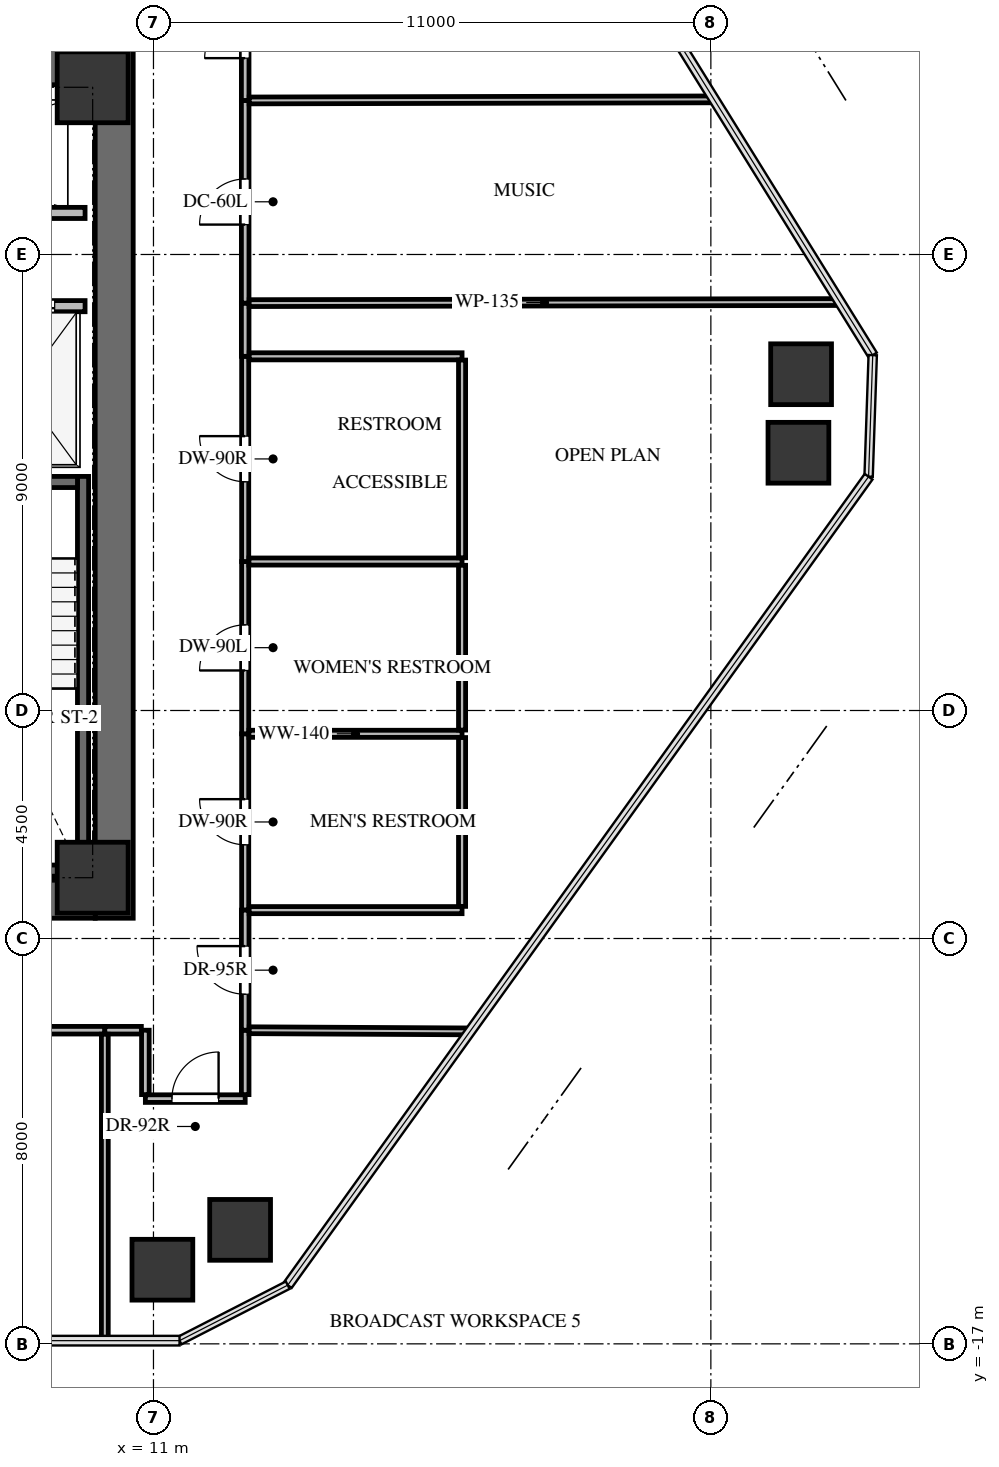
"""IFC4 building model, lengths in metres.
Left out: names, types, materials, properties, quantities, classifications, styles, units other than length and angle.
Written with IfcOpenShell. Run it as: python <this file> out.ifc"""

import sys

from ifc_helpers import new_model, si_unit, direction, frame, frame_2d, origin, origin_2d, place, context, subcontext, project, spatial, rectangle, extrude, source, transform, mapped, element, fill, save


model = new_model("IFC4")
c1 = context("Model", 3, precision=1e-05, world=origin(), true_north=direction((0.0, 1.0)))
c2 = subcontext(c1, "Body", "Model", "MODEL_VIEW")
j1 = project(units=[si_unit("LENGTHUNIT", "METRE"), si_unit("PLANEANGLEUNIT", "RADIAN")], contexts=[c1])
p1 = place(None, origin())
s1 = spatial("IfcSite", under=j1, at=p1, CompositionType="ELEMENT")
p2 = place(p1, origin())
s2 = spatial("IfcBuilding", under=s1, at=p2, CompositionType="ELEMENT")
p3 = place(p2, frame((0.0, 0.0, 130.5)))
s3 = spatial("IfcBuildingStorey", under=s2, at=p3, CompositionType="ELEMENT", Elevation=130.5)
p4 = place(p3, frame((10.225, -8.6, 0.0), z_axis=(0.0, 0.0, 1.0), x_axis=(0.0, 1.0, 0.0)))
e1 = element("IfcWall", 1, at=p4, inside=s3, PredefinedType="SHEAR", context=c2, shape_type="SweptSolid", body=[
    extrude(rectangle(XDim=17.2, YDim=0.75, at=frame_2d((8.6, 0.0))), origin(), (0.0, 0.0, 1.0), 3.3),
])
p5 = place(p3, frame((2.1, -8.225, 0.0), z_axis=(0.0, 0.0, 1.0), x_axis=(1.0, 0.0, 0.0)))
e2 = element("IfcWall", 2, at=p5, inside=s3, PredefinedType="SHEAR", context=c2, shape_type="SweptSolid", body=[
    extrude(rectangle(XDim=7.75, YDim=0.75, at=frame_2d((3.875, 0.0))), origin(), (0.0, 0.0, 1.0), 3.3),
])
p6 = place(p3, frame((-9.85, 8.225, 0.0), z_axis=(0.0, 0.0, 1.0), x_axis=(1.0, 0.0, 0.0)))
e3 = element("IfcWall", 3, at=p6, inside=s3, PredefinedType="SHEAR", context=c2, shape_type="SweptSolid", body=[
    extrude(rectangle(XDim=19.7, YDim=0.75, at=frame_2d((9.85, 0.0))), origin(), (0.0, 0.0, 1.0), 3.3),
])
p7 = place(p3, frame((9.61, -7.77, -0.24), z_axis=(0.0, 0.0, 1.0), x_axis=(0.0, 1.0, 0.0)))
e4 = element("IfcWall", 4, at=p7, inside=s3, PredefinedType="SHEAR", context=c2, shape_type="SweptSolid", body=[
    extrude(rectangle(XDim=7.89, YDim=0.22, at=frame_2d((3.945, 0.0))), origin(), (0.0, 0.0, 1.0), 3.3),
])
for number, where, z_axis, x_axis in (
    (5, (6.54, -7.66, -0.24), (0.0, 0.0, 1.0), (1.0, 0.0, 0.0)),
    (6, (9.5, 0.01, -0.24), (0.0, 0.0, 1.0), (-1.0, 0.0, 0.0)),
):
    element("IfcWall", number, at=place(p3, frame(where, z_axis=z_axis, x_axis=x_axis)), inside=s3, PredefinedType="SHEAR", context=c2, shape_type="SweptSolid", body=[
        extrude(rectangle(XDim=2.96, YDim=0.22, at=frame_2d((1.48, 0.0))), origin(), (0.0, 0.0, 1.0), 3.3),
    ])
m1 = source(origin(), c2, "Body", "SweptSolid", [
    extrude(rectangle(XDim=1.4, YDim=1.4, at=origin_2d()), origin(), (0.0, 0.0, 1.0), 3.3),
])
for number, where, z_axis, x_axis in (
    (7, (9.8, -7.8, -0.24), (0.0, 0.0, 1.0), (1.0, 0.0, 0.0)),
    (8, (9.8, 7.8, -0.24), (0.0, 0.0, 1.0), (1.0, 0.0, 0.0)),
):
    element("IfcColumn", number, at=place(p3, frame(where, z_axis=z_axis, x_axis=x_axis)), inside=s3, PredefinedType="COLUMN", context=c2, shape_type="MappedRepresentation", body=[
        mapped(m1, transform((0.0, 0.0, 0.0), x_axis=(1.0, 0.0, 0.0), y_axis=(0.0, 1.0, 0.0), z_axis=(0.0, 0.0, 1.0), scale=1.0)),
    ])
m2 = source(origin(), c2, "Body", "SweptSolid", [
    extrude(rectangle(XDim=1.2, YDim=1.2, at=origin_2d()), origin(), (0.0, 0.0, 1.0), 3.3),
])
for number, where, z_axis, x_axis in (
    (9, (23.781, 2.137, -0.24), (0.0, 0.0, 1.0), (1.0, 0.0, 0.0)),
    (10, (23.728, 0.587, -0.24), (0.0, 0.0, 1.0), (1.0, 0.0, 0.0)),
    (11, (12.71, -14.75, -0.24), (0.0, 0.0, 1.0), (1.0, 0.0, 0.0)),
    (12, (11.176, -15.537, -0.24), (0.0, 0.0, 1.0), (1.0, 0.0, 0.0)),
):
    element("IfcColumn", number, at=place(p3, frame(where, z_axis=z_axis, x_axis=x_axis)), inside=s3, PredefinedType="COLUMN", context=c2, shape_type="MappedRepresentation", body=[
        mapped(m2, transform((0.0, 0.0, 0.0), x_axis=(1.0, 0.0, 0.0), y_axis=(0.0, 1.0, 0.0), z_axis=(0.0, 0.0, 1.0), scale=1.0)),
    ])
p8 = place(p3, frame((4.6, 3.48, 0.0), z_axis=(0.0, 0.0, 1.0), x_axis=(1.0, 0.0, 0.0)))
e13 = element("IfcWall", 13, at=p8, inside=s3, PredefinedType="SOLIDWALL", context=c2, shape_type="SweptSolid", body=[
    extrude(rectangle(XDim=5.05, YDim=0.22, at=frame_2d((2.525, 0.0))), origin(), (0.0, 0.0, 1.0), 3.045),
])
p9 = place(p8, frame((0.55, 0.0, 0.0)))
e14 = element("IfcOpeningElement", 14, at=p9, cuts=e13, PredefinedType="OPENING", context=c2, shape_type="SweptSolid", body=[
    extrude(rectangle(XDim=1.4, YDim=2.15, at=frame_2d((0.7, 1.075))), frame((0.0, 0.12, 0.0), z_axis=(0.0, -1.0, 0.0), x_axis=(1.0, 0.0, 0.0)), (0.0, 0.0, 1.0), 0.24),
])
p10 = place(p8, frame((3.05, 0.0, 0.0)))
e15 = element("IfcOpeningElement", 15, at=p10, cuts=e13, PredefinedType="OPENING", context=c2, shape_type="SweptSolid", body=[
    extrude(rectangle(XDim=1.4, YDim=2.15, at=frame_2d((0.7, 1.075))), frame((0.0, 0.12, 0.0), z_axis=(0.0, -1.0, 0.0), x_axis=(1.0, 0.0, 0.0)), (0.0, 0.0, 1.0), 0.24),
])
p11 = place(p3, frame((2.325, 5.32, 0.0), z_axis=(0.0, 0.0, 1.0), x_axis=(1.0, 0.0, 0.0)))
e16 = element("IfcWall", 16, at=p11, inside=s3, PredefinedType="SOLIDWALL", context=c2, shape_type="SweptSolid", body=[
    extrude(rectangle(XDim=7.325, YDim=0.22, at=frame_2d((3.663, 0.0))), origin(), (0.0, 0.0, 1.0), 3.045),
])
p12 = place(p3, frame((12.81, -8.44, 0.0), z_axis=(0.0, 0.0, 1.0), x_axis=(0.0, 1.0, 0.0)))
e17 = element("IfcWall", 17, at=p12, inside=s3, PredefinedType="PARTITIONING", context=c2, shape_type="SweptSolid", body=[
    extrude(rectangle(XDim=3.48, YDim=0.14, at=frame_2d((1.74, 0.0))), origin(), (0.0, 0.0, 1.0), 3.045),
])
p13 = place(p12, frame((1.29, 0.0, 0.0)))
e18 = element("IfcOpeningElement", 18, at=p13, cuts=e17, PredefinedType="OPENING", context=c2, shape_type="SweptSolid", body=[
    extrude(rectangle(XDim=0.9, YDim=2.05, at=frame_2d((0.45, 1.025))), frame((0.0, 0.08, 0.0), z_axis=(0.0, -1.0, 0.0), x_axis=(1.0, 0.0, 0.0)), (0.0, 0.0, 1.0), 0.16),
])
p14 = place(p3, frame((12.81, -4.96, 0.0), z_axis=(0.0, 0.0, 1.0), x_axis=(0.0, 1.0, 0.0)))
e19 = element("IfcWall", 19, at=p14, inside=s3, PredefinedType="PARTITIONING", context=c2, shape_type="SweptSolid", body=[
    extrude(rectangle(XDim=3.4, YDim=0.14, at=frame_2d((1.7, 0.0))), origin(), (0.0, 0.0, 1.0), 3.045),
])
p15 = place(p14, frame((1.25, 0.0, 0.0)))
e20 = element("IfcOpeningElement", 20, at=p15, cuts=e19, PredefinedType="OPENING", context=c2, shape_type="SweptSolid", body=[
    extrude(rectangle(XDim=0.9, YDim=2.05, at=frame_2d((0.45, 1.025))), frame((0.0, 0.08, 0.0), z_axis=(0.0, -1.0, 0.0), x_axis=(1.0, 0.0, 0.0)), (0.0, 0.0, 1.0), 0.16),
])
p16 = place(p3, frame((12.81, -1.56, 0.0), z_axis=(0.0, 0.0, 1.0), x_axis=(0.0, 1.0, 0.0)))
e21 = element("IfcWall", 21, at=p16, inside=s3, PredefinedType="PARTITIONING", context=c2, shape_type="SweptSolid", body=[
    extrude(rectangle(XDim=4.05, YDim=0.14, at=frame_2d((2.025, 0.0))), origin(), (0.0, 0.0, 1.0), 2.212),
])
p17 = place(p16, frame((1.575, 0.0, 0.0)))
e22 = element("IfcOpeningElement", 22, at=p17, cuts=e21, PredefinedType="OPENING", context=c2, shape_type="SweptSolid", body=[
    extrude(rectangle(XDim=0.9, YDim=2.05, at=frame_2d((0.45, 1.025))), frame((0.0, 0.08, 0.0), z_axis=(0.0, -1.0, 0.0), x_axis=(1.0, 0.0, 0.0)), (0.0, 0.0, 1.0), 0.16),
])
p18 = place(p3, frame((2.54, -10.81, 0.0), z_axis=(0.0, 0.0, 1.0), x_axis=(1.0, 0.0, 0.0)))
e23 = element("IfcWall", 23, at=p18, inside=s3, PredefinedType="PARTITIONING", context=c2, shape_type="SweptSolid", body=[
    extrude(rectangle(XDim=7.5, YDim=0.15, at=frame_2d((3.75, 0.0))), origin(), (0.0, 0.0, 1.0), 2.212),
])
p19 = place(p18, frame((3.3, 0.0, 0.0)))
e24 = element("IfcOpeningElement", 24, at=p19, cuts=e23, PredefinedType="OPENING", context=c2, shape_type="SweptSolid", body=[
    extrude(rectangle(XDim=0.9, YDim=2.05, at=frame_2d((0.45, 1.025))), frame((0.0, 0.085, 0.0), z_axis=(0.0, -1.0, 0.0), x_axis=(1.0, 0.0, 0.0)), (0.0, 0.0, 1.0), 0.17),
])
p20 = place(p3, frame((10.84, -12.16, 0.0), z_axis=(0.0, 0.0, 1.0), x_axis=(1.0, 0.0, 0.0)))
e25 = element("IfcWall", 25, at=p20, inside=s3, PredefinedType="PARTITIONING", context=c2, shape_type="SweptSolid", body=[
    extrude(rectangle(XDim=1.97, YDim=0.15, at=frame_2d((0.985, 0.0))), origin(), (0.0, 0.0, 1.0), 3.045),
])
p21 = place(p20, frame((0.525, 0.0, 0.0)))
e26 = element("IfcOpeningElement", 26, at=p21, cuts=e25, PredefinedType="OPENING", context=c2, shape_type="SweptSolid", body=[
    extrude(rectangle(XDim=0.92, YDim=2.1, at=frame_2d((0.46, 1.05))), frame((0.0, 0.085, 0.0), z_axis=(0.0, -1.0, 0.0), x_axis=(1.0, 0.0, 0.0)), (0.0, 0.0, 1.0), 0.17),
])
for number, where, z_axis, x_axis in (
    (27, (10.84, -10.81, 0.0), (0.0, 0.0, 1.0), (0.0, -1.0, 0.0)),
    (28, (12.81, -12.081, 0.0), (0.0, 0.0, 1.0), (0.0, 1.0, 0.0)),
):
    element("IfcWall", number, at=place(p3, frame(where, z_axis=z_axis, x_axis=x_axis)), inside=s3, PredefinedType="PARTITIONING", context=c2, shape_type="SweptSolid", body=[
        extrude(rectangle(XDim=1.271, YDim=0.15, at=frame_2d((0.635, 0.0))), origin(), (0.0, 0.0, 1.0), 3.045),
    ])
p22 = place(p3, frame((10.04, -10.81, 0.0), z_axis=(0.0, 0.0, 1.0), x_axis=(1.0, 0.0, 0.0)))
e29 = element("IfcWall", 29, at=p22, inside=s3, PredefinedType="PARTITIONING", context=c2, shape_type="SweptSolid", body=[
    extrude(rectangle(XDim=0.721, YDim=0.15, at=frame_2d((0.36, 0.0))), origin(), (0.0, 0.0, 1.0), 3.045),
])
p23 = place(p3, frame((12.81, -10.81, 0.0), z_axis=(0.0, 0.0, 1.0), x_axis=(0.0, 1.0, 0.0)))
e30 = element("IfcWall", 30, at=p23, inside=s3, PredefinedType="PARTITIONING", context=c2, shape_type="SweptSolid", body=[
    extrude(rectangle(XDim=2.37, YDim=0.15, at=frame_2d((1.185, 0.0))), origin(), (0.0, 0.0, 1.0), 3.045),
])
p24 = place(p23, frame((0.71, 0.0, 0.0)))
e31 = element("IfcOpeningElement", 31, at=p24, cuts=e30, PredefinedType="OPENING", context=c2, shape_type="SweptSolid", body=[
    extrude(rectangle(XDim=0.95, YDim=2.1, at=frame_2d((0.475, 1.05))), frame((0.0, 0.085, 0.0), z_axis=(0.0, -1.0, 0.0), x_axis=(1.0, 0.0, 0.0)), (0.0, 0.0, 1.0), 0.17),
])
p25 = place(p3, frame((12.81, 2.49, 0.0), z_axis=(0.0, 0.0, 1.0), x_axis=(0.0, 1.0, 0.0)))
e32 = element("IfcWall", 32, at=p25, inside=s3, PredefinedType="PARTITIONING", context=c2, shape_type="SweptSolid", body=[
    extrude(rectangle(XDim=1.05, YDim=0.15, at=frame_2d((0.525, 0.0))), origin(), (0.0, 0.0, 1.0), 3.045),
])
p26 = place(p3, frame((12.81, 3.54, 0.0), z_axis=(0.0, 0.0, 1.0), x_axis=(0.0, 1.0, 0.0)))
e33 = element("IfcWall", 33, at=p26, inside=s3, PredefinedType="PARTITIONING", context=c2, shape_type="SweptSolid", body=[
    extrude(rectangle(XDim=4.0, YDim=0.15, at=frame_2d((2.0, 0.0))), origin(), (0.0, 0.0, 1.0), 3.045),
])
p27 = place(p26, frame((1.55, 0.0, 0.0)))
e34 = element("IfcOpeningElement", 34, at=p27, cuts=e33, PredefinedType="OPENING", context=c2, shape_type="SweptSolid", body=[
    extrude(rectangle(XDim=0.9, YDim=2.05, at=frame_2d((0.45, 1.025))), frame((0.0, 0.085, 0.0), z_axis=(0.0, -1.0, 0.0), x_axis=(1.0, 0.0, 0.0)), (0.0, 0.0, 1.0), 0.17),
])
p28 = place(p3, frame((12.81, 7.54, 0.0), z_axis=(0.0, 0.0, 1.0), x_axis=(0.0, 1.0, 0.0)))
e35 = element("IfcWall", 35, at=p28, inside=s3, PredefinedType="PARTITIONING", context=c2, shape_type="SweptSolid", body=[
    extrude(rectangle(XDim=3.27, YDim=0.15, at=frame_2d((1.635, 0.0))), origin(), (0.0, 0.0, 1.0), 3.045),
])
p29 = place(p28, frame((0.835, 0.0, 0.0)))
e36 = element("IfcOpeningElement", 36, at=p29, cuts=e35, PredefinedType="OPENING", context=c2, shape_type="SweptSolid", body=[
    extrude(rectangle(XDim=1.6, YDim=2.15, at=frame_2d((0.8, 1.075))), frame((0.0, 0.085, 0.0), z_axis=(0.0, -1.0, 0.0), x_axis=(1.0, 0.0, 0.0)), (0.0, 0.0, 1.0), 0.17),
])
p30 = place(p3, frame((12.884, -4.96, 0.0), z_axis=(0.0, 0.0, 1.0), x_axis=(1.0, 0.0, 0.0)))
e37 = element("IfcWall", 37, at=p30, inside=s3, PredefinedType="PARTITIONING", context=c2, shape_type="SweptSolid", body=[
    extrude(rectangle(XDim=4.206, YDim=0.14, at=frame_2d((2.103, 0.0))), origin(), (0.0, 0.0, 1.0), 3.045),
])
p31 = place(p3, frame((17.09, -8.44, 0.0), z_axis=(0.0, 0.0, 1.0), x_axis=(-1.0, 0.0, 0.0)))
e38 = element("IfcWall", 38, at=p31, inside=s3, PredefinedType="PARTITIONING", context=c2, shape_type="SweptSolid", body=[
    extrude(rectangle(XDim=4.201, YDim=0.14, at=frame_2d((2.101, 0.0))), origin(), (0.0, 0.0, 1.0), 2.38),
])
p32 = place(p3, frame((17.09, -5.034, 0.0), z_axis=(0.0, 0.0, 1.0), x_axis=(0.0, -1.0, 0.0)))
e39 = element("IfcWall", 39, at=p32, inside=s3, PredefinedType="PARTITIONING", context=c2, shape_type="SweptSolid", body=[
    extrude(rectangle(XDim=3.332, YDim=0.14, at=frame_2d((1.666, 0.0))), origin(), (0.0, 0.0, 1.0), 2.38),
])
p33 = place(p3, frame((12.884, -1.56, 0.0), z_axis=(0.0, 0.0, 1.0), x_axis=(1.0, 0.0, 0.0)))
e40 = element("IfcWall", 40, at=p33, inside=s3, PredefinedType="PARTITIONING", context=c2, shape_type="SweptSolid", body=[
    extrude(rectangle(XDim=4.206, YDim=0.14, at=frame_2d((2.103, 0.0))), origin(), (0.0, 0.0, 1.0), 3.045),
])
p34 = place(p3, frame((17.09, -1.634, 0.0), z_axis=(0.0, 0.0, 1.0), x_axis=(0.0, -1.0, 0.0)))
e41 = element("IfcWall", 41, at=p34, inside=s3, PredefinedType="PARTITIONING", context=c2, shape_type="SweptSolid", body=[
    extrude(rectangle(XDim=3.252, YDim=0.14, at=frame_2d((1.626, 0.0))), origin(), (0.0, 0.0, 1.0), 3.045),
])
p35 = place(p3, frame((12.889, 2.49, 0.0), z_axis=(0.0, 0.0, 1.0), x_axis=(1.0, 0.0, 0.0)))
e42 = element("IfcWall", 42, at=p35, inside=s3, PredefinedType="PARTITIONING", context=c2, shape_type="SweptSolid", body=[
    extrude(rectangle(XDim=4.201, YDim=0.14, at=frame_2d((2.101, 0.0))), origin(), (0.0, 0.0, 1.0), 3.045),
])
p36 = place(p3, frame((17.09, 2.416, 0.0), z_axis=(0.0, 0.0, 1.0), x_axis=(0.0, -1.0, 0.0)))
e43 = element("IfcWall", 43, at=p36, inside=s3, PredefinedType="PARTITIONING", context=c2, shape_type="SweptSolid", body=[
    extrude(rectangle(XDim=3.902, YDim=0.14, at=frame_2d((1.951, 0.0))), origin(), (0.0, 0.0, 1.0), 2.212),
])
p37 = place(p3, frame((10.04, -10.889, 0.0), z_axis=(0.0, 0.0, 1.0), x_axis=(0.0, -1.0, 0.0)))
e44 = element("IfcWall", 44, at=p37, inside=s3, PredefinedType="PARTITIONING", context=c2, shape_type="SweptSolid", body=[
    extrude(rectangle(XDim=6.048, YDim=0.135, at=frame_2d((3.024, 0.0))), origin(), (0.0, 0.0, 1.0), 2.212),
])
p38 = place(p3, frame((12.889, -10.81, 0.0), z_axis=(0.0, 0.0, 1.0), x_axis=(0.999986140562, -0.005264853658, 0.0)))
e45 = element("IfcWall", 45, at=p38, inside=s3, PredefinedType="PARTITIONING", context=c2, shape_type="SweptSolid", body=[
    extrude(rectangle(XDim=4.359, YDim=0.135, at=frame_2d((2.179, 0.0))), origin(), (0.0, 0.0, 1.0), 2.38),
])
p39 = place(p3, frame((12.889, 3.54, 0.0), z_axis=(0.0, 0.0, 1.0), x_axis=(0.999998377575, 0.001801345995, 0.0)))
e46 = element("IfcWall", 46, at=p39, inside=s3, PredefinedType="PARTITIONING", context=c2, shape_type="SweptSolid", body=[
    extrude(rectangle(XDim=11.656, YDim=0.135, at=frame_2d((5.828, 0.0))), origin(), (0.0, 0.0, 1.0), 2.38),
])
p40 = place(p3, frame((12.889, 7.54, 0.0), z_axis=(0.0, 0.0, 1.0), x_axis=(0.99999744191, 0.002261895808, 0.0)))
e47 = element("IfcWall", 47, at=p40, inside=s3, PredefinedType="PARTITIONING", context=c2, shape_type="SweptSolid", body=[
    extrude(rectangle(XDim=9.175, YDim=0.135, at=frame_2d((4.587, 0.0))), origin(), (0.0, 0.0, 1.0), 2.38),
])
m3 = source(origin(), c2, "Body", "SweptSolid", [
    extrude(rectangle(XDim=1.4, YDim=2.15, at=frame_2d((0.7, 1.075))), frame((0.0, 0.025, 0.0), z_axis=(0.0, -1.0, 0.0), x_axis=(1.0, 0.0, 0.0)), (0.0, 0.0, 1.0), 0.05),
])
p41 = place(p10, origin())
e48 = element("IfcDoor", 48, at=p41, inside=s3, OperationType="DOUBLE_DOOR_SLIDING", PredefinedType="DOOR", context=c2, shape_type="MappedRepresentation", body=[
    mapped(m3, transform((0.0, 0.0, 0.0), x_axis=(1.0, 0.0, 0.0), y_axis=(0.0, 1.0, 0.0), z_axis=(0.0, 0.0, 1.0), scale=1.0)),
])
fill(e15, e48)
m4 = source(origin(), c2, "Body", "SweptSolid", [
    extrude(rectangle(XDim=0.9, YDim=2.05, at=frame_2d((0.45, 1.025))), frame((0.0, 0.025, 0.0), z_axis=(0.0, -1.0, 0.0), x_axis=(1.0, 0.0, 0.0)), (0.0, 0.0, 1.0), 0.05),
])
p42 = place(p13, origin())
e49 = element("IfcDoor", 49, at=p42, inside=s3, OperationType="SINGLE_SWING_RIGHT", PredefinedType="DOOR", context=c2, shape_type="MappedRepresentation", body=[
    mapped(m4, transform((0.0, 0.0, 0.0), x_axis=(1.0, 0.0, 0.0), y_axis=(0.0, 1.0, 0.0), z_axis=(0.0, 0.0, 1.0), scale=1.0)),
])
fill(e18, e49)
m5 = source(origin(), c2, "Body", "SweptSolid", [
    extrude(rectangle(XDim=0.9, YDim=2.05, at=frame_2d((0.45, 1.025))), frame((0.0, 0.025, 0.0), z_axis=(0.0, -1.0, 0.0), x_axis=(1.0, 0.0, 0.0)), (0.0, 0.0, 1.0), 0.05),
])
p43 = place(p15, origin())
e50 = element("IfcDoor", 50, at=p43, inside=s3, OperationType="SINGLE_SWING_LEFT", PredefinedType="DOOR", context=c2, shape_type="MappedRepresentation", body=[
    mapped(m5, transform((0.0, 0.0, 0.0), x_axis=(1.0, 0.0, 0.0), y_axis=(0.0, 1.0, 0.0), z_axis=(0.0, 0.0, 1.0), scale=1.0)),
])
fill(e20, e50)
p44 = place(p17, origin())
e51 = element("IfcDoor", 51, at=p44, inside=s3, OperationType="SINGLE_SWING_RIGHT", PredefinedType="DOOR", context=c2, shape_type="MappedRepresentation", body=[
    mapped(m4, transform((0.0, 0.0, 0.0), x_axis=(1.0, 0.0, 0.0), y_axis=(0.0, 1.0, 0.0), z_axis=(0.0, 0.0, 1.0), scale=1.0)),
])
fill(e22, e51)
m6 = source(origin(), c2, "Body", "SweptSolid", [
    extrude(rectangle(XDim=0.92, YDim=2.1, at=frame_2d((0.46, 1.05))), frame((0.0, 0.025, 0.0), z_axis=(0.0, -1.0, 0.0), x_axis=(1.0, 0.0, 0.0)), (0.0, 0.0, 1.0), 0.05),
])
p45 = place(p21, origin())
e52 = element("IfcDoor", 52, at=p45, inside=s3, OperationType="SINGLE_SWING_RIGHT", PredefinedType="DOOR", context=c2, shape_type="MappedRepresentation", body=[
    mapped(m6, transform((0.0, 0.0, 0.0), x_axis=(1.0, 0.0, 0.0), y_axis=(0.0, 1.0, 0.0), z_axis=(0.0, 0.0, 1.0), scale=1.0)),
])
fill(e26, e52)
m7 = source(origin(), c2, "Body", "SweptSolid", [
    extrude(rectangle(XDim=0.95, YDim=2.1, at=frame_2d((0.475, 1.05))), frame((0.0, 0.025, 0.0), z_axis=(0.0, -1.0, 0.0), x_axis=(1.0, 0.0, 0.0)), (0.0, 0.0, 1.0), 0.05),
])
p46 = place(p24, origin())
e53 = element("IfcDoor", 53, at=p46, inside=s3, OperationType="SINGLE_SWING_RIGHT", PredefinedType="DOOR", context=c2, shape_type="MappedRepresentation", body=[
    mapped(m7, transform((0.0, 0.0, 0.0), x_axis=(1.0, 0.0, 0.0), y_axis=(0.0, 1.0, 0.0), z_axis=(0.0, 0.0, 1.0), scale=1.0)),
])
fill(e31, e53)
m8 = source(origin(), c2, "Body", "SweptSolid", [
    extrude(rectangle(XDim=0.9, YDim=2.05, at=frame_2d((0.45, 1.025))), frame((0.0, 0.025, 0.0), z_axis=(0.0, -1.0, 0.0), x_axis=(1.0, 0.0, 0.0)), (0.0, 0.0, 1.0), 0.05),
])
p47 = place(p27, origin())
e54 = element("IfcDoor", 54, at=p47, inside=s3, OperationType="SINGLE_SWING_LEFT", PredefinedType="DOOR", context=c2, shape_type="MappedRepresentation", body=[
    mapped(m8, transform((0.0, 0.0, 0.0), x_axis=(1.0, 0.0, 0.0), y_axis=(0.0, 1.0, 0.0), z_axis=(0.0, 0.0, 1.0), scale=1.0)),
])
fill(e34, e54)
m9 = source(origin(), c2, "Body", "SweptSolid", [
    extrude(rectangle(XDim=1.6, YDim=2.15, at=frame_2d((0.8, 1.075))), frame((0.0, 0.025, 0.0), z_axis=(0.0, -1.0, 0.0), x_axis=(1.0, 0.0, 0.0)), (0.0, 0.0, 1.0), 0.05),
])
p48 = place(p29, origin())
e55 = element("IfcDoor", 55, at=p48, inside=s3, OperationType="DOUBLE_DOOR_SINGLE_SWING", PredefinedType="DOOR", context=c2, shape_type="MappedRepresentation", body=[
    mapped(m9, transform((0.0, 0.0, 0.0), x_axis=(1.0, 0.0, 0.0), y_axis=(0.0, 1.0, 0.0), z_axis=(0.0, 0.0, 1.0), scale=1.0)),
])
fill(e36, e55)
save(model, sys.argv[1])
